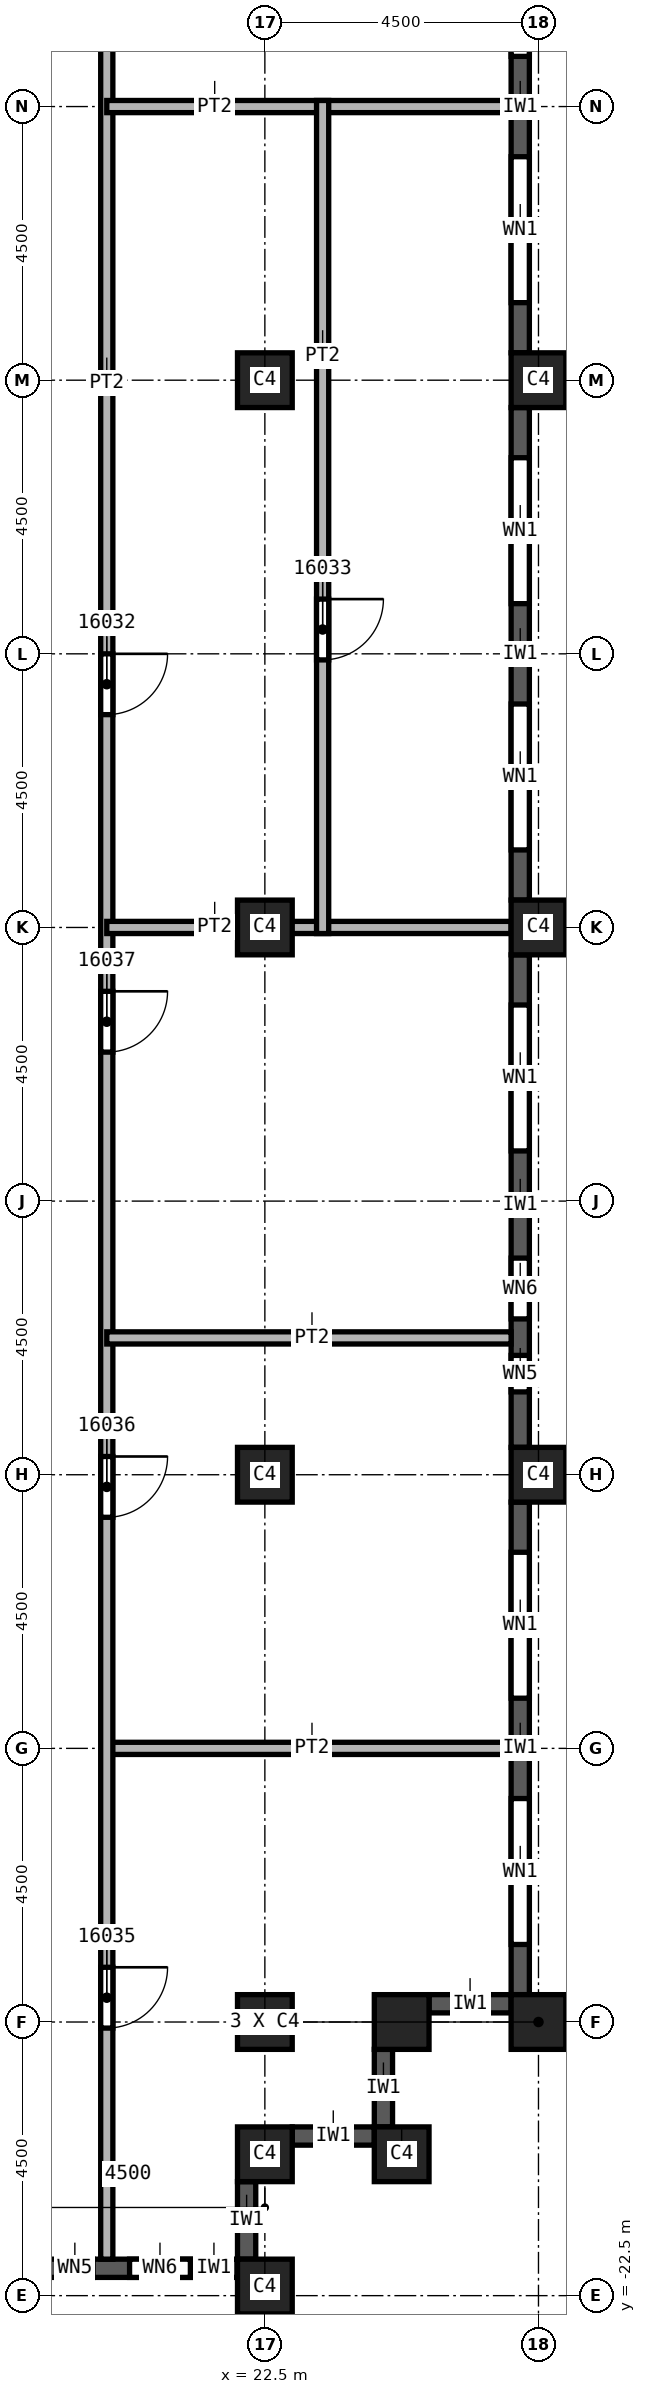
"""IFC4 building model, lengths in metres.
Left out: names, types, materials, properties, quantities, classifications, styles, units other than length and angle.
Written with IfcOpenShell. Run it as: python <this file> out.ifc"""

import sys

from ifc_helpers import new_model, si_unit, direction, frame, frame_2d, origin, origin_2d, place, context, subcontext, project, spatial, rectangle, extrude, element, fill, save


model = new_model("IFC4")
c1 = context("Model", 3, precision=1e-05, world=origin(), true_north=direction((0.0, 1.0)))
c2 = subcontext(c1, "Body", "Model", "MODEL_VIEW")
j1 = project(units=[si_unit("LENGTHUNIT", "METRE"), si_unit("PLANEANGLEUNIT", "RADIAN")], contexts=[c1])
p1 = place(None, origin())
s1 = spatial("IfcSite", under=j1, at=p1, CompositionType="ELEMENT")
p2 = place(p1, origin())
s2 = spatial("IfcBuilding", under=s1, at=p2, CompositionType="ELEMENT")
p3 = place(p2, frame((0.0, 0.0, 242.0)))
s3 = spatial("IfcBuildingStorey", under=s2, at=p3, CompositionType="ELEMENT", Elevation=242.0)
for number, where, z_axis, x_axis in (
    (1, (22.5, 0.0, 0.0), (0.0, 0.0, 1.0), (1.0, 0.0, 0.0)),
    (2, (22.5, 9.0, 0.0), (0.0, 0.0, 1.0), (1.0, 0.0, 0.0)),
    (3, (22.5, -9.0, 0.0), (0.0, 0.0, 1.0), (1.0, 0.0, 0.0)),
    (4, (22.5, -18.0, 0.0), (0.0, 0.0, 1.0), (1.0, 0.0, 0.0)),
    (5, (27.0, 0.0, 0.0), (0.0, 0.0, 1.0), (0.0, 1.0, 0.0)),
    (6, (27.0, 9.0, 0.0), (0.0, 0.0, 1.0), (0.0, 1.0, 0.0)),
    (7, (27.0, -9.0, 0.0), (0.0, 0.0, 1.0), (0.0, 1.0, 0.0)),
    (8, (27.0, -18.0, 0.0), (0.0, 0.0, 1.0), (0.0, 1.0, 0.0)),
    (9, (22.5, -22.35, 0.0), (0.0, 0.0, 1.0), (1.0, 0.0, 0.0)),
    (10, (22.5, -20.175, 0.0), (0.0, 0.0, 1.0), (1.0, 0.0, 0.0)),
    (11, (24.75, -20.175, 0.0), (0.0, 0.0, 1.0), (1.0, 0.0, 0.0)),
    (12, (24.75, -18.0, 0.0), (0.0, 0.0, 1.0), (1.0, 0.0, 0.0)),
):
    element("IfcColumn", number, at=place(p3, frame(where, z_axis=z_axis, x_axis=x_axis)), inside=s3, PredefinedType="COLUMN", context=c2, shape_type="SweptSolid", body=[
        extrude(rectangle(XDim=0.9, YDim=0.9, at=origin_2d()), origin(), (0.0, 0.0, 1.0), 3.72),
    ])
p4 = place(p3, frame((18.45, -22.05, 0.0), z_axis=(0.0, 0.0, 1.0), x_axis=(1.0, 0.0, 0.0)))
e13 = element("IfcWall", 13, at=p4, inside=s3, PredefinedType="SOLIDWALL", context=c2, shape_type="SweptSolid", body=[
    extrude(rectangle(XDim=3.6, YDim=0.3, at=frame_2d((1.8, 0.0))), origin(), (0.0, 0.0, 1.0), 3.12),
])
p5 = place(p4, frame((0.625, 0.0, 0.8)))
e14 = element("IfcOpeningElement", 14, at=p5, cuts=e13, PredefinedType="OPENING", context=c2, shape_type="SweptSolid", body=[
    extrude(rectangle(XDim=0.6, YDim=1.95, at=frame_2d((0.3, 0.975))), frame((0.0, 0.15, 0.0), z_axis=(0.0, -1.0, 0.0), x_axis=(1.0, 0.0, 0.0)), (0.0, 0.0, 1.0), 0.3),
])
p6 = place(p4, frame((1.825, 0.0, 0.8)))
e15 = element("IfcOpeningElement", 15, at=p6, cuts=e13, PredefinedType="OPENING", context=c2, shape_type="SweptSolid", body=[
    extrude(rectangle(XDim=1.0, YDim=1.95, at=frame_2d((0.5, 0.975))), frame((0.0, 0.15, 0.0), z_axis=(0.0, -1.0, 0.0), x_axis=(1.0, 0.0, 0.0)), (0.0, 0.0, 1.0), 0.3),
])
p7 = place(p3, frame((22.2, -21.9, 0.0), z_axis=(0.0, 0.0, 1.0), x_axis=(0.0, 1.0, 0.0)))
e16 = element("IfcWall", 16, at=p7, inside=s3, PredefinedType="SOLIDWALL", context=c2, shape_type="SweptSolid", body=[
    extrude(rectangle(XDim=1.275, YDim=0.3, at=frame_2d((0.637, 0.0))), origin(), (0.0, 0.0, 1.0), 3.12),
])
p8 = place(p3, frame((22.95, -19.875, 0.0), z_axis=(0.0, 0.0, 1.0), x_axis=(1.0, 0.0, 0.0)))
e17 = element("IfcWall", 17, at=p8, inside=s3, PredefinedType="SOLIDWALL", context=c2, shape_type="SweptSolid", body=[
    extrude(rectangle(XDim=1.35, YDim=0.3, at=frame_2d((0.675, 0.0))), origin(), (0.0, 0.0, 1.0), 3.12),
])
p9 = place(p3, frame((24.45, -19.725, 0.0), z_axis=(0.0, 0.0, 1.0), x_axis=(0.0, 1.0, 0.0)))
e18 = element("IfcWall", 18, at=p9, inside=s3, PredefinedType="SOLIDWALL", context=c2, shape_type="SweptSolid", body=[
    extrude(rectangle(XDim=1.275, YDim=0.3, at=frame_2d((0.638, 0.0))), origin(), (0.0, 0.0, 1.0), 3.12),
])
p10 = place(p3, frame((25.2, -17.7, 0.0), z_axis=(0.0, 0.0, 1.0), x_axis=(1.0, 0.0, 0.0)))
e19 = element("IfcWall", 19, at=p10, inside=s3, PredefinedType="SOLIDWALL", context=c2, shape_type="SweptSolid", body=[
    extrude(rectangle(XDim=1.35, YDim=0.3, at=frame_2d((0.675, 0.0))), origin(), (0.0, 0.0, 1.0), 3.12),
])
p11 = place(p3, frame((26.7, -17.55, 0.0), z_axis=(0.0, 0.0, 1.0), x_axis=(0.0, 1.0, 0.0)))
e20 = element("IfcWall", 20, at=p11, inside=s3, PredefinedType="SOLIDWALL", context=c2, shape_type="SweptSolid", body=[
    extrude(rectangle(XDim=8.1, YDim=0.3, at=frame_2d((4.05, 0.0))), origin(), (0.0, 0.0, 1.0), 3.12),
])
p12 = place(p11, frame((0.825, 0.0, 0.8)))
e21 = element("IfcOpeningElement", 21, at=p12, cuts=e20, PredefinedType="OPENING", context=c2, shape_type="SweptSolid", body=[
    extrude(rectangle(XDim=2.4, YDim=1.95, at=frame_2d((1.2, 0.975))), frame((0.0, 0.15, 0.0), z_axis=(0.0, -1.0, 0.0), x_axis=(1.0, 0.0, 0.0)), (0.0, 0.0, 1.0), 0.3),
])
p13 = place(p11, frame((4.875, 0.0, 0.8)))
e22 = element("IfcOpeningElement", 22, at=p13, cuts=e20, PredefinedType="OPENING", context=c2, shape_type="SweptSolid", body=[
    extrude(rectangle(XDim=2.4, YDim=1.95, at=frame_2d((1.2, 0.975))), frame((0.0, 0.15, 0.0), z_axis=(0.0, -1.0, 0.0), x_axis=(1.0, 0.0, 0.0)), (0.0, 0.0, 1.0), 0.3),
])
p14 = place(p3, frame((26.7, -8.55, 0.0), z_axis=(0.0, 0.0, 1.0), x_axis=(0.0, 1.0, 0.0)))
e23 = element("IfcWall", 23, at=p14, inside=s3, PredefinedType="SOLIDWALL", context=c2, shape_type="SweptSolid", body=[
    extrude(rectangle(XDim=8.1, YDim=0.3, at=frame_2d((4.05, 0.0))), origin(), (0.0, 0.0, 1.0), 3.12),
])
p15 = place(p14, frame((4.875, 0.0, 0.8)))
e24 = element("IfcOpeningElement", 24, at=p15, cuts=e23, PredefinedType="OPENING", context=c2, shape_type="SweptSolid", body=[
    extrude(rectangle(XDim=2.4, YDim=1.95, at=frame_2d((1.2, 0.975))), frame((0.0, 0.15, 0.0), z_axis=(0.0, -1.0, 0.0), x_axis=(1.0, 0.0, 0.0)), (0.0, 0.0, 1.0), 0.3),
])
p16 = place(p14, frame((0.913, 0.0, 0.8)))
e25 = element("IfcOpeningElement", 25, at=p16, cuts=e23, PredefinedType="OPENING", context=c2, shape_type="SweptSolid", body=[
    extrude(rectangle(XDim=0.6, YDim=1.95, at=frame_2d((0.3, 0.975))), frame((0.0, 0.15, 0.0), z_axis=(0.0, -1.0, 0.0), x_axis=(1.0, 0.0, 0.0)), (0.0, 0.0, 1.0), 0.3),
])
p17 = place(p14, frame((2.113, 0.0, 0.8)))
e26 = element("IfcOpeningElement", 26, at=p17, cuts=e23, PredefinedType="OPENING", context=c2, shape_type="SweptSolid", body=[
    extrude(rectangle(XDim=1.0, YDim=1.95, at=frame_2d((0.5, 0.975))), frame((0.0, 0.15, 0.0), z_axis=(0.0, -1.0, 0.0), x_axis=(1.0, 0.0, 0.0)), (0.0, 0.0, 1.0), 0.3),
])
p18 = place(p3, frame((26.7, 0.45, 0.0), z_axis=(0.0, 0.0, 1.0), x_axis=(0.0, 1.0, 0.0)))
e27 = element("IfcWall", 27, at=p18, inside=s3, PredefinedType="SOLIDWALL", context=c2, shape_type="SweptSolid", body=[
    extrude(rectangle(XDim=8.1, YDim=0.3, at=frame_2d((4.05, 0.0))), origin(), (0.0, 0.0, 1.0), 3.12),
])
p19 = place(p18, frame((0.825, 0.0, 0.8)))
e28 = element("IfcOpeningElement", 28, at=p19, cuts=e27, PredefinedType="OPENING", context=c2, shape_type="SweptSolid", body=[
    extrude(rectangle(XDim=2.4, YDim=1.95, at=frame_2d((1.2, 0.975))), frame((0.0, 0.15, 0.0), z_axis=(0.0, -1.0, 0.0), x_axis=(1.0, 0.0, 0.0)), (0.0, 0.0, 1.0), 0.3),
])
p20 = place(p18, frame((4.875, 0.0, 0.8)))
e29 = element("IfcOpeningElement", 29, at=p20, cuts=e27, PredefinedType="OPENING", context=c2, shape_type="SweptSolid", body=[
    extrude(rectangle(XDim=2.4, YDim=1.95, at=frame_2d((1.2, 0.975))), frame((0.0, 0.15, 0.0), z_axis=(0.0, -1.0, 0.0), x_axis=(1.0, 0.0, 0.0)), (0.0, 0.0, 1.0), 0.3),
])
p21 = place(p3, frame((26.7, 9.45, 0.0), z_axis=(0.0, 0.0, 1.0), x_axis=(0.0, 1.0, 0.0)))
e30 = element("IfcWall", 30, at=p21, inside=s3, PredefinedType="SOLIDWALL", context=c2, shape_type="SweptSolid", body=[
    extrude(rectangle(XDim=8.1, YDim=0.3, at=frame_2d((4.05, 0.0))), origin(), (0.0, 0.0, 1.0), 3.12),
])
p22 = place(p21, frame((0.825, 0.0, 0.8)))
e31 = element("IfcOpeningElement", 31, at=p22, cuts=e30, PredefinedType="OPENING", context=c2, shape_type="SweptSolid", body=[
    extrude(rectangle(XDim=2.4, YDim=1.95, at=frame_2d((1.2, 0.975))), frame((0.0, 0.15, 0.0), z_axis=(0.0, -1.0, 0.0), x_axis=(1.0, 0.0, 0.0)), (0.0, 0.0, 1.0), 0.3),
])
p23 = place(p21, frame((4.875, 0.0, 0.8)))
e32 = element("IfcOpeningElement", 32, at=p23, cuts=e30, PredefinedType="OPENING", context=c2, shape_type="SweptSolid", body=[
    extrude(rectangle(XDim=2.4, YDim=1.95, at=frame_2d((1.2, 0.975))), frame((0.0, 0.15, 0.0), z_axis=(0.0, -1.0, 0.0), x_axis=(1.0, 0.0, 0.0)), (0.0, 0.0, 1.0), 0.3),
])
p24 = place(p3, frame((19.9, -13.5, 0.0), z_axis=(0.0, 0.0, 1.0), x_axis=(1.0, 0.0, 0.0)))
e33 = element("IfcWall", 33, at=p24, inside=s3, PredefinedType="PARTITIONING", context=c2, shape_type="SweptSolid", body=[
    extrude(rectangle(XDim=6.65, YDim=0.2, at=frame_2d((3.325, 0.0))), origin(), (0.0, 0.0, 1.0), 3.72),
])
p25 = place(p3, frame((19.9, 21.9, 0.0), z_axis=(0.0, 0.0, 1.0), x_axis=(0.0, -1.0, 0.0)))
e34 = element("IfcWall", 34, at=p25, inside=s3, PredefinedType="PARTITIONING", context=c2, shape_type="SweptSolid", body=[
    extrude(rectangle(XDim=43.8, YDim=0.2, at=frame_2d((21.9, 0.0))), origin(), (0.0, 0.0, 1.0), 3.72),
])
p26 = place(p25, frame((17.4, 0.0, 0.0)))
e35 = element("IfcOpeningElement", 35, at=p26, cuts=e34, PredefinedType="OPENING", context=c2, shape_type="SweptSolid", body=[
    extrude(rectangle(XDim=1.0, YDim=2.1, at=frame_2d((0.5, 1.05))), frame((0.0, 0.1, 0.0), z_axis=(0.0, -1.0, 0.0), x_axis=(1.0, 0.0, 0.0)), (0.0, 0.0, 1.0), 0.2),
])
p27 = place(p25, frame((4.6, 0.0, 0.0)))
e36 = element("IfcOpeningElement", 36, at=p27, cuts=e34, PredefinedType="OPENING", context=c2, shape_type="SweptSolid", body=[
    extrude(rectangle(XDim=1.0, YDim=2.1, at=frame_2d((0.5, 1.05))), frame((0.0, 0.1, 0.0), z_axis=(0.0, -1.0, 0.0), x_axis=(1.0, 0.0, 0.0)), (0.0, 0.0, 1.0), 0.2),
])
p28 = place(p25, frame((39.0, 0.0, 0.0)))
e37 = element("IfcOpeningElement", 37, at=p28, cuts=e34, PredefinedType="OPENING", context=c2, shape_type="SweptSolid", body=[
    extrude(rectangle(XDim=1.0, YDim=2.1, at=frame_2d((0.5, 1.05))), frame((0.0, 0.1, 0.0), z_axis=(0.0, -1.0, 0.0), x_axis=(1.0, 0.0, 0.0)), (0.0, 0.0, 1.0), 0.2),
])
p29 = place(p25, frame((30.6, 0.0, 0.0)))
e38 = element("IfcOpeningElement", 38, at=p29, cuts=e34, PredefinedType="OPENING", context=c2, shape_type="SweptSolid", body=[
    extrude(rectangle(XDim=1.0, YDim=2.1, at=frame_2d((0.5, 1.05))), frame((0.0, 0.1, 0.0), z_axis=(0.0, -1.0, 0.0), x_axis=(1.0, 0.0, 0.0)), (0.0, 0.0, 1.0), 0.2),
])
p30 = place(p25, frame((22.95, 0.0, 0.0)))
e39 = element("IfcOpeningElement", 39, at=p30, cuts=e34, PredefinedType="OPENING", context=c2, shape_type="SweptSolid", body=[
    extrude(rectangle(XDim=1.0, YDim=2.1, at=frame_2d((0.5, 1.05))), frame((0.0, 0.1, 0.0), z_axis=(0.0, -1.0, 0.0), x_axis=(1.0, 0.0, 0.0)), (0.0, 0.0, 1.0), 0.2),
])
for number, where, z_axis, x_axis in (
    (40, (19.9, -6.75, 0.0), (0.0, 0.0, 1.0), (1.0, 0.0, 0.0)),
    (41, (19.9, 13.5, 0.0), (0.0, 0.0, 1.0), (1.0, 0.0, 0.0)),
    (42, (26.55, 0.0, 0.0), (0.0, 0.0, 1.0), (-1.0, 0.0, 0.0)),
):
    element("IfcWall", number, at=place(p3, frame(where, z_axis=z_axis, x_axis=x_axis)), inside=s3, PredefinedType="PARTITIONING", context=c2, shape_type="SweptSolid", body=[
        extrude(rectangle(XDim=6.65, YDim=0.2, at=frame_2d((3.325, 0.0))), origin(), (0.0, 0.0, 1.0), 3.72),
    ])
p31 = place(p3, frame((23.45, 13.6, 0.0), z_axis=(0.0, 0.0, 1.0), x_axis=(0.0, -1.0, 0.0)))
e43 = element("IfcWall", 43, at=p31, inside=s3, PredefinedType="PARTITIONING", context=c2, shape_type="SweptSolid", body=[
    extrude(rectangle(XDim=13.7, YDim=0.2, at=frame_2d((6.85, 0.0))), origin(), (0.0, 0.0, 1.0), 3.72),
])
p32 = place(p31, frame((8.2, 0.0, 0.0)))
e44 = element("IfcOpeningElement", 44, at=p32, cuts=e43, PredefinedType="OPENING", context=c2, shape_type="SweptSolid", body=[
    extrude(rectangle(XDim=1.0, YDim=2.1, at=frame_2d((0.5, 1.05))), frame((0.0, 0.1, 0.0), z_axis=(0.0, -1.0, 0.0), x_axis=(1.0, 0.0, 0.0)), (0.0, 0.0, 1.0), 0.2),
])
p33 = place(p12, origin())
e45 = element("IfcWindow", 45, at=p33, inside=s3, PartitioningType="SINGLE_PANEL", PredefinedType="WINDOW", context=c2, shape_type="SweptSolid", body=[
    extrude(rectangle(XDim=2.4, YDim=1.95, at=frame_2d((1.2, 0.975))), frame((0.0, 0.03, 0.0), z_axis=(0.0, -1.0, 0.0), x_axis=(1.0, 0.0, 0.0)), (0.0, 0.0, 1.0), 0.06),
])
fill(e21, e45)
p34 = place(p13, origin())
e46 = element("IfcWindow", 46, at=p34, inside=s3, PartitioningType="SINGLE_PANEL", PredefinedType="WINDOW", context=c2, shape_type="SweptSolid", body=[
    extrude(rectangle(XDim=2.4, YDim=1.95, at=frame_2d((1.2, 0.975))), frame((0.0, 0.03, 0.0), z_axis=(0.0, -1.0, 0.0), x_axis=(1.0, 0.0, 0.0)), (0.0, 0.0, 1.0), 0.06),
])
fill(e22, e46)
p35 = place(p15, origin())
e47 = element("IfcWindow", 47, at=p35, inside=s3, PartitioningType="SINGLE_PANEL", PredefinedType="WINDOW", context=c2, shape_type="SweptSolid", body=[
    extrude(rectangle(XDim=2.4, YDim=1.95, at=frame_2d((1.2, 0.975))), frame((0.0, 0.03, 0.0), z_axis=(0.0, -1.0, 0.0), x_axis=(1.0, 0.0, 0.0)), (0.0, 0.0, 1.0), 0.06),
])
fill(e24, e47)
p36 = place(p19, origin())
e48 = element("IfcWindow", 48, at=p36, inside=s3, PartitioningType="SINGLE_PANEL", PredefinedType="WINDOW", context=c2, shape_type="SweptSolid", body=[
    extrude(rectangle(XDim=2.4, YDim=1.95, at=frame_2d((1.2, 0.975))), frame((0.0, 0.03, 0.0), z_axis=(0.0, -1.0, 0.0), x_axis=(1.0, 0.0, 0.0)), (0.0, 0.0, 1.0), 0.06),
])
fill(e28, e48)
p37 = place(p20, origin())
e49 = element("IfcWindow", 49, at=p37, inside=s3, PartitioningType="SINGLE_PANEL", PredefinedType="WINDOW", context=c2, shape_type="SweptSolid", body=[
    extrude(rectangle(XDim=2.4, YDim=1.95, at=frame_2d((1.2, 0.975))), frame((0.0, 0.03, 0.0), z_axis=(0.0, -1.0, 0.0), x_axis=(1.0, 0.0, 0.0)), (0.0, 0.0, 1.0), 0.06),
])
fill(e29, e49)
p38 = place(p22, origin())
e50 = element("IfcWindow", 50, at=p38, inside=s3, PartitioningType="SINGLE_PANEL", PredefinedType="WINDOW", context=c2, shape_type="SweptSolid", body=[
    extrude(rectangle(XDim=2.4, YDim=1.95, at=frame_2d((1.2, 0.975))), frame((0.0, 0.03, 0.0), z_axis=(0.0, -1.0, 0.0), x_axis=(1.0, 0.0, 0.0)), (0.0, 0.0, 1.0), 0.06),
])
fill(e31, e50)
p39 = place(p23, origin())
e51 = element("IfcWindow", 51, at=p39, inside=s3, PartitioningType="SINGLE_PANEL", PredefinedType="WINDOW", context=c2, shape_type="SweptSolid", body=[
    extrude(rectangle(XDim=2.4, YDim=1.95, at=frame_2d((1.2, 0.975))), frame((0.0, 0.03, 0.0), z_axis=(0.0, -1.0, 0.0), x_axis=(1.0, 0.0, 0.0)), (0.0, 0.0, 1.0), 0.06),
])
fill(e32, e51)
p40 = place(p26, origin())
e52 = element("IfcDoor", 52, at=p40, inside=s3, OperationType="SINGLE_SWING_LEFT", PredefinedType="DOOR", context=c2, shape_type="SweptSolid", body=[
    extrude(rectangle(XDim=1.0, YDim=2.1, at=frame_2d((0.5, 1.05))), frame((0.0, 0.025, 0.0), z_axis=(0.0, -1.0, 0.0), x_axis=(1.0, 0.0, 0.0)), (0.0, 0.0, 1.0), 0.05),
])
fill(e35, e52)
p41 = place(p32, origin())
e53 = element("IfcDoor", 53, at=p41, inside=s3, OperationType="SINGLE_SWING_RIGHT", PredefinedType="DOOR", context=c2, shape_type="SweptSolid", body=[
    extrude(rectangle(XDim=1.0, YDim=2.1, at=frame_2d((0.5, 1.05))), frame((0.0, 0.025, 0.0), z_axis=(0.0, -1.0, 0.0), x_axis=(1.0, 0.0, 0.0)), (0.0, 0.0, 1.0), 0.05),
])
fill(e44, e53)
p42 = place(p28, origin())
e54 = element("IfcDoor", 54, at=p42, inside=s3, OperationType="SINGLE_SWING_RIGHT", PredefinedType="DOOR", context=c2, shape_type="SweptSolid", body=[
    extrude(rectangle(XDim=1.0, YDim=2.1, at=frame_2d((0.5, 1.05))), frame((0.0, 0.025, 0.0), z_axis=(0.0, -1.0, 0.0), x_axis=(1.0, 0.0, 0.0)), (0.0, 0.0, 1.0), 0.05),
])
fill(e37, e54)
p43 = place(p29, origin())
e55 = element("IfcDoor", 55, at=p43, inside=s3, OperationType="SINGLE_SWING_LEFT", PredefinedType="DOOR", context=c2, shape_type="SweptSolid", body=[
    extrude(rectangle(XDim=1.0, YDim=2.1, at=frame_2d((0.5, 1.05))), frame((0.0, 0.025, 0.0), z_axis=(0.0, -1.0, 0.0), x_axis=(1.0, 0.0, 0.0)), (0.0, 0.0, 1.0), 0.05),
])
fill(e38, e55)
p44 = place(p30, origin())
e56 = element("IfcDoor", 56, at=p44, inside=s3, OperationType="SINGLE_SWING_RIGHT", PredefinedType="DOOR", context=c2, shape_type="SweptSolid", body=[
    extrude(rectangle(XDim=1.0, YDim=2.1, at=frame_2d((0.5, 1.05))), frame((0.0, 0.025, 0.0), z_axis=(0.0, -1.0, 0.0), x_axis=(1.0, 0.0, 0.0)), (0.0, 0.0, 1.0), 0.05),
])
fill(e39, e56)
p45 = place(p5, origin())
e57 = element("IfcWindow", 57, at=p45, inside=s3, PartitioningType="SINGLE_PANEL", PredefinedType="WINDOW", context=c2, shape_type="SweptSolid", body=[
    extrude(rectangle(XDim=0.6, YDim=1.95, at=frame_2d((0.3, 0.975))), frame((0.0, 0.03, 0.0), z_axis=(0.0, -1.0, 0.0), x_axis=(1.0, 0.0, 0.0)), (0.0, 0.0, 1.0), 0.06),
])
fill(e14, e57)
p46 = place(p6, origin())
e58 = element("IfcWindow", 58, at=p46, inside=s3, PartitioningType="SINGLE_PANEL", PredefinedType="WINDOW", context=c2, shape_type="SweptSolid", body=[
    extrude(rectangle(XDim=1.0, YDim=1.95, at=frame_2d((0.5, 0.975))), frame((0.0, 0.03, 0.0), z_axis=(0.0, -1.0, 0.0), x_axis=(1.0, 0.0, 0.0)), (0.0, 0.0, 1.0), 0.06),
])
fill(e15, e58)
p47 = place(p16, origin())
e59 = element("IfcWindow", 59, at=p47, inside=s3, PartitioningType="SINGLE_PANEL", PredefinedType="WINDOW", context=c2, shape_type="SweptSolid", body=[
    extrude(rectangle(XDim=0.6, YDim=1.95, at=frame_2d((0.3, 0.975))), frame((0.0, 0.03, 0.0), z_axis=(0.0, -1.0, 0.0), x_axis=(1.0, 0.0, 0.0)), (0.0, 0.0, 1.0), 0.06),
])
fill(e25, e59)
p48 = place(p17, origin())
e60 = element("IfcWindow", 60, at=p48, inside=s3, PartitioningType="SINGLE_PANEL", PredefinedType="WINDOW", context=c2, shape_type="SweptSolid", body=[
    extrude(rectangle(XDim=1.0, YDim=1.95, at=frame_2d((0.5, 0.975))), frame((0.0, 0.03, 0.0), z_axis=(0.0, -1.0, 0.0), x_axis=(1.0, 0.0, 0.0)), (0.0, 0.0, 1.0), 0.06),
])
fill(e26, e60)
save(model, sys.argv[1])
